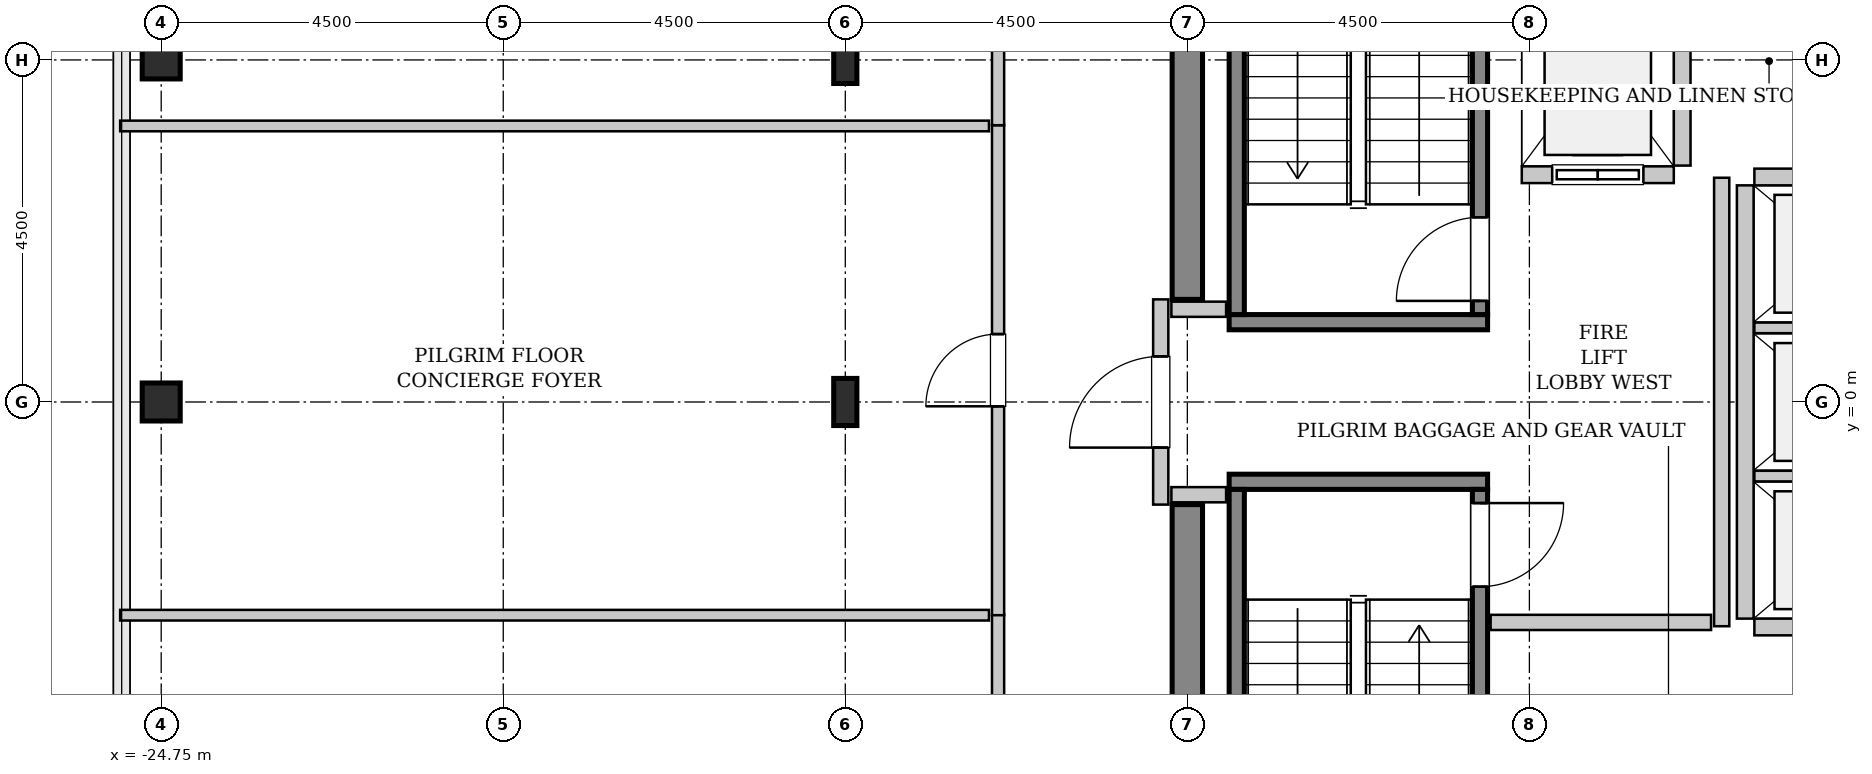
"""IFC4 building model, lengths in metres.
Left out: names, types, materials, properties, quantities, classifications, styles, units other than length and angle.
Written with IfcOpenShell. Run it as: python <this file> out.ifc"""

import sys

from ifc_helpers import new_model, si_unit, direction, frame, frame_2d, origin, origin_2d, place, context, subcontext, project, spatial, rectangle, hollow_rectangle, i_section, extrude, source, transform, mapped, element, fill, save


model = new_model("IFC4")
c1 = context("Model", 3, precision=1e-05, world=origin(), true_north=direction((0.0, 1.0)))
c2 = subcontext(c1, "Body", "Model", "MODEL_VIEW")
j1 = project(units=[si_unit("LENGTHUNIT", "METRE"), si_unit("PLANEANGLEUNIT", "RADIAN")], contexts=[c1])
p1 = place(None, origin())
s1 = spatial("IfcSite", under=j1, at=p1, CompositionType="ELEMENT")
p2 = place(p1, origin())
s2 = spatial("IfcBuilding", under=s1, at=p2, CompositionType="ELEMENT")
p3 = place(p2, frame((0.0, 0.0, 337.6)))
s3 = spatial("IfcBuildingStorey", under=s2, at=p3, CompositionType="ELEMENT", Elevation=337.6)
m1 = source(origin(), c2, "Body", "SweptSolid", [
    extrude(rectangle(XDim=7.45, YDim=0.4, at=frame_2d((3.725, 0.0))), origin(), (0.0, 0.0, 1.0), 3.8),
])
for number, where, z_axis, x_axis in (
    (1, (-11.25, -8.8, 0.0), (0.0, 0.0, 1.0), (0.0, 1.0, 0.0)),
    (2, (-11.25, 1.35, 0.0), (0.0, 0.0, 1.0), (0.0, 1.0, 0.0)),
):
    element("IfcWall", number, at=place(p3, frame(where, z_axis=z_axis, x_axis=x_axis)), inside=s3, PredefinedType="SHEAR", context=c2, shape_type="MappedRepresentation", body=[
        mapped(m1, transform((0.0, 0.0, 0.0), x_axis=(1.0, 0.0, 0.0), y_axis=(0.0, 1.0, 0.0), z_axis=(0.0, 0.0, 1.0), scale=1.0)),
    ])
m2 = source(origin(), c2, "Body", "SweptSolid", [
    extrude(hollow_rectangle(XDim=0.5, YDim=0.5, WallThickness=0.025, InnerFilletRadius=0.025, OuterFilletRadius=0.05, at=origin_2d()), origin(), (0.0, 0.0, 1.0), 3.8),
])
for number, where, z_axis, x_axis in (
    (3, (-24.75, 0.0, 0.0), (0.0, 0.0, 1.0), (1.0, 0.0, 0.0)),
    (4, (-24.75, 4.5, 0.0), (0.0, 0.0, 1.0), (1.0, 0.0, 0.0)),
):
    element("IfcColumn", number, at=place(p3, frame(where, z_axis=z_axis, x_axis=x_axis)), inside=s3, PredefinedType="COLUMN", context=c2, shape_type="MappedRepresentation", body=[
        mapped(m2, transform((0.0, 0.0, 0.0), x_axis=(1.0, 0.0, 0.0), y_axis=(0.0, 1.0, 0.0), z_axis=(0.0, 0.0, 1.0), scale=1.0)),
    ])
m3 = source(origin(), c2, "Body", "SweptSolid", [
    extrude(i_section(OverallWidth=0.305, OverallDepth=0.62, WebThickness=0.021, FlangeThickness=0.04, FilletRadius=0.027, at=origin_2d()), origin(), (0.0, 0.0, 1.0), 3.8),
])
for number, where, z_axis, x_axis in (
    (5, (-15.75, 0.0, 0.0), (0.0, 0.0, 1.0), (1.0, 0.0, 0.0)),
    (6, (-15.75, 4.5, 0.0), (0.0, 0.0, 1.0), (1.0, 0.0, 0.0)),
):
    element("IfcColumn", number, at=place(p3, frame(where, z_axis=z_axis, x_axis=x_axis)), inside=s3, PredefinedType="COLUMN", context=c2, shape_type="MappedRepresentation", body=[
        mapped(m3, transform((0.0, 0.0, 0.0), x_axis=(1.0, 0.0, 0.0), y_axis=(0.0, 1.0, 0.0), z_axis=(0.0, 0.0, 1.0), scale=1.0)),
    ])
m4 = source(origin(), c2, "Body", "SweptSolid", [
    extrude(rectangle(XDim=3.4, YDim=0.2, at=frame_2d((1.7, 0.0))), origin(), (0.0, 0.0, 1.0), 3.8),
])
p4 = place(p3, frame((-7.3, 1.05, 0.0), z_axis=(0.0, 0.0, 1.0), x_axis=(-1.0, 0.0, 0.0)))
e7 = element("IfcWall", 7, at=p4, inside=s3, PredefinedType="SOLIDWALL", context=c2, shape_type="MappedRepresentation", body=[
    mapped(m4, transform((0.0, 0.0, 0.0), x_axis=(1.0, 0.0, 0.0), y_axis=(0.0, 1.0, 0.0), z_axis=(0.0, 0.0, 1.0), scale=1.0)),
])
m5 = source(origin(), c2, "Body", "SweptSolid", [
    extrude(rectangle(XDim=7.1, YDim=0.2, at=frame_2d((3.55, 0.0))), origin(), (0.0, 0.0, 1.0), 3.8),
])
p5 = place(p3, frame((-7.4, 1.15, 0.0), z_axis=(0.0, 0.0, 1.0), x_axis=(0.0, 1.0, 0.0)))
e8 = element("IfcWall", 8, at=p5, inside=s3, PredefinedType="SOLIDWALL", context=c2, shape_type="MappedRepresentation", body=[
    mapped(m5, transform((0.0, 0.0, 0.0), x_axis=(1.0, 0.0, 0.0), y_axis=(0.0, 1.0, 0.0), z_axis=(0.0, 0.0, 1.0), scale=1.0)),
])
p6 = place(p5, frame((0.18, 0.0, 0.0)))
e9 = element("IfcOpeningElement", 9, at=p6, cuts=e8, PredefinedType="OPENING", context=c2, shape_type="SweptSolid", body=[
    extrude(rectangle(XDim=1.1, YDim=2.15, at=frame_2d((0.55, 1.075))), frame((0.0, 0.11, 0.0), z_axis=(0.0, -1.0, 0.0), x_axis=(1.0, 0.0, 0.0)), (0.0, 0.0, 1.0), 0.22),
])
p7 = place(p3, frame((-10.6, 1.15, 0.0), z_axis=(0.0, 0.0, 1.0), x_axis=(0.0, 1.0, 0.0)))
e10 = element("IfcWall", 10, at=p7, inside=s3, PredefinedType="SOLIDWALL", context=c2, shape_type="MappedRepresentation", body=[
    mapped(m5, transform((0.0, 0.0, 0.0), x_axis=(1.0, 0.0, 0.0), y_axis=(0.0, 1.0, 0.0), z_axis=(0.0, 0.0, 1.0), scale=1.0)),
])
p8 = place(p3, frame((-10.7, -1.05, 0.0), z_axis=(0.0, 0.0, 1.0), x_axis=(1.0, 0.0, 0.0)))
e11 = element("IfcWall", 11, at=p8, inside=s3, PredefinedType="SOLIDWALL", context=c2, shape_type="MappedRepresentation", body=[
    mapped(m4, transform((0.0, 0.0, 0.0), x_axis=(1.0, 0.0, 0.0), y_axis=(0.0, 1.0, 0.0), z_axis=(0.0, 0.0, 1.0), scale=1.0)),
])
p9 = place(p3, frame((-10.6, -1.15, 0.0), z_axis=(0.0, 0.0, 1.0), x_axis=(0.0, -1.0, 0.0)))
e12 = element("IfcWall", 12, at=p9, inside=s3, PredefinedType="SOLIDWALL", context=c2, shape_type="MappedRepresentation", body=[
    mapped(m5, transform((0.0, 0.0, 0.0), x_axis=(1.0, 0.0, 0.0), y_axis=(0.0, 1.0, 0.0), z_axis=(0.0, 0.0, 1.0), scale=1.0)),
])
p10 = place(p3, frame((-7.4, -1.15, 0.0), z_axis=(0.0, 0.0, 1.0), x_axis=(0.0, -1.0, 0.0)))
e13 = element("IfcWall", 13, at=p10, inside=s3, PredefinedType="SOLIDWALL", context=c2, shape_type="MappedRepresentation", body=[
    mapped(m5, transform((0.0, 0.0, 0.0), x_axis=(1.0, 0.0, 0.0), y_axis=(0.0, 1.0, 0.0), z_axis=(0.0, 0.0, 1.0), scale=1.0)),
])
p11 = place(p10, frame((0.18, 0.0, 0.0)))
e14 = element("IfcOpeningElement", 14, at=p11, cuts=e13, PredefinedType="OPENING", context=c2, shape_type="SweptSolid", body=[
    extrude(rectangle(XDim=1.1, YDim=2.15, at=frame_2d((0.55, 1.075))), frame((0.0, 0.11, 0.0), z_axis=(0.0, -1.0, 0.0), x_axis=(1.0, 0.0, 0.0)), (0.0, 0.0, 1.0), 0.22),
])
m6 = source(origin(), c2, "Body", "SweptSolid", [
    extrude(rectangle(XDim=2.0, YDim=0.22, at=frame_2d((1.0, 0.0))), origin(), (0.0, 0.0, 1.0), 3.535),
])
p12 = place(p3, frame((-6.85, 2.99, 0.0), z_axis=(0.0, 0.0, 1.0), x_axis=(1.0, 0.0, 0.0)))
e15 = element("IfcWall", 15, at=p12, inside=s3, PredefinedType="SOLIDWALL", context=c2, shape_type="MappedRepresentation", body=[
    mapped(m6, transform((0.0, 0.0, 0.0), x_axis=(1.0, 0.0, 0.0), y_axis=(0.0, 1.0, 0.0), z_axis=(0.0, 0.0, 1.0), scale=1.0)),
])
p13 = place(p12, frame((0.4, 0.0, 0.0)))
e16 = element("IfcOpeningElement", 16, at=p13, cuts=e15, PredefinedType="OPENING", context=c2, shape_type="SweptSolid", body=[
    extrude(rectangle(XDim=1.2, YDim=2.2, at=frame_2d((0.6, 1.1))), frame((0.0, 0.12, 0.0), z_axis=(0.0, -1.0, 0.0), x_axis=(1.0, 0.0, 0.0)), (0.0, 0.0, 1.0), 0.24),
])
m7 = source(origin(), c2, "Body", "SweptSolid", [
    extrude(rectangle(XDim=2.68, YDim=0.22, at=frame_2d((1.34, 0.0))), origin(), (0.0, 0.0, 1.0), 3.535),
])
p14 = place(p3, frame((-4.74, 3.11, 0.0), z_axis=(0.0, 0.0, 1.0), x_axis=(0.0, 1.0, 0.0)))
e17 = element("IfcWall", 17, at=p14, inside=s3, PredefinedType="SOLIDWALL", context=c2, shape_type="MappedRepresentation", body=[
    mapped(m7, transform((0.0, 0.0, 0.0), x_axis=(1.0, 0.0, 0.0), y_axis=(0.0, 1.0, 0.0), z_axis=(0.0, 0.0, 1.0), scale=1.0)),
])
m8 = source(origin(), c2, "Body", "SweptSolid", [
    extrude(rectangle(XDim=5.7, YDim=0.22, at=frame_2d((2.85, 0.0))), origin(), (0.0, 0.0, 1.0), 3.535),
])
p15 = place(p3, frame((-3.91, 2.85, 0.0), z_axis=(0.0, 0.0, 1.0), x_axis=(0.0, -1.0, 0.0)))
e18 = element("IfcWall", 18, at=p15, inside=s3, PredefinedType="SOLIDWALL", context=c2, shape_type="MappedRepresentation", body=[
    mapped(m8, transform((0.0, 0.0, 0.0), x_axis=(1.0, 0.0, 0.0), y_axis=(0.0, 1.0, 0.0), z_axis=(0.0, 0.0, 1.0), scale=1.0)),
])
m9 = source(origin(), c2, "Body", "SweptSolid", [
    extrude(rectangle(XDim=2.13, YDim=0.22, at=frame_2d((1.065, 0.0))), origin(), (0.0, 0.0, 1.0), 3.535),
])
p16 = place(p3, frame((-3.79, -2.96, 0.0), z_axis=(0.0, 0.0, 1.0), x_axis=(1.0, 0.0, 0.0)))
e19 = element("IfcWall", 19, at=p16, inside=s3, PredefinedType="SOLIDWALL", context=c2, shape_type="MappedRepresentation", body=[
    mapped(m9, transform((0.0, 0.0, 0.0), x_axis=(1.0, 0.0, 0.0), y_axis=(0.0, 1.0, 0.0), z_axis=(0.0, 0.0, 1.0), scale=1.0)),
])
m10 = source(origin(), c2, "Body", "SweptSolid", [
    extrude(rectangle(XDim=2.13, YDim=0.14, at=frame_2d((1.065, 0.0))), origin(), (0.0, 0.0, 1.0), 3.535),
])
for number, where, z_axis, x_axis in (
    (20, (-3.79, -0.975, 0.0), (0.0, 0.0, 1.0), (1.0, 0.0, 0.0)),
    (21, (-3.79, 0.975, 0.0), (0.0, 0.0, 1.0), (1.0, 0.0, 0.0)),
):
    element("IfcWall", number, at=place(p3, frame(where, z_axis=z_axis, x_axis=x_axis)), inside=s3, PredefinedType="PARTITIONING", context=c2, shape_type="MappedRepresentation", body=[
        mapped(m10, transform((0.0, 0.0, 0.0), x_axis=(1.0, 0.0, 0.0), y_axis=(0.0, 1.0, 0.0), z_axis=(0.0, 0.0, 1.0), scale=1.0)),
    ])
p17 = place(p3, frame((-1.66, 2.96, 0.0), z_axis=(0.0, 0.0, 1.0), x_axis=(-1.0, 0.0, 0.0)))
e22 = element("IfcWall", 22, at=p17, inside=s3, PredefinedType="SOLIDWALL", context=c2, shape_type="MappedRepresentation", body=[
    mapped(m9, transform((0.0, 0.0, 0.0), x_axis=(1.0, 0.0, 0.0), y_axis=(0.0, 1.0, 0.0), z_axis=(0.0, 0.0, 1.0), scale=1.0)),
])
m11 = source(origin(), c2, "Body", "SweptSolid", [
    extrude(rectangle(XDim=2.7, YDim=0.2, at=frame_2d((1.35, 0.0))), origin(), (0.0, 0.0, 1.0), 2.625),
])
p18 = place(p3, frame((-11.6, -1.35, 0.0), z_axis=(0.0, 0.0, 1.0), x_axis=(0.0, 1.0, 0.0)))
e23 = element("IfcWall", 23, at=p18, inside=s3, PredefinedType="PARTITIONING", context=c2, shape_type="MappedRepresentation", body=[
    mapped(m11, transform((0.0, 0.0, 0.0), x_axis=(1.0, 0.0, 0.0), y_axis=(0.0, 1.0, 0.0), z_axis=(0.0, 0.0, 1.0), scale=1.0)),
])
p19 = place(p18, frame((0.75, 0.0, 0.0)))
e24 = element("IfcOpeningElement", 24, at=p19, cuts=e23, PredefinedType="OPENING", context=c2, shape_type="SweptSolid", body=[
    extrude(rectangle(XDim=1.2, YDim=2.15, at=frame_2d((0.6, 1.075))), frame((0.0, 0.11, 0.0), z_axis=(0.0, -1.0, 0.0), x_axis=(1.0, 0.0, 0.0)), (0.0, 0.0, 1.0), 0.22),
])
m12 = source(origin(), c2, "Body", "SweptSolid", [
    extrude(rectangle(XDim=5.9, YDim=0.2, at=frame_2d((2.95, 0.0))), origin(), (0.0, 0.0, 1.0), 3.535),
])
p20 = place(p3, frame((-4.22, -2.95, 0.0), z_axis=(0.0, 0.0, 1.0), x_axis=(0.0, 1.0, 0.0)))
e25 = element("IfcWall", 25, at=p20, inside=s3, PredefinedType="PARTITIONING", context=c2, shape_type="MappedRepresentation", body=[
    mapped(m12, transform((0.0, 0.0, 0.0), x_axis=(1.0, 0.0, 0.0), y_axis=(0.0, 1.0, 0.0), z_axis=(0.0, 0.0, 1.0), scale=1.0)),
])
m13 = source(origin(), c2, "Body", "SweptSolid", [
    extrude(rectangle(XDim=2.9, YDim=0.2, at=frame_2d((1.45, 0.0))), origin(), (0.0, 0.0, 1.0), 3.535),
])
p21 = place(p3, frame((-7.26, -2.9, 0.0), z_axis=(0.0, 0.0, 1.0), x_axis=(1.0, 0.0, 0.0)))
e26 = element("IfcWall", 26, at=p21, inside=s3, PredefinedType="PARTITIONING", context=c2, shape_type="MappedRepresentation", body=[
    mapped(m13, transform((0.0, 0.0, 0.0), x_axis=(1.0, 0.0, 0.0), y_axis=(0.0, 1.0, 0.0), z_axis=(0.0, 0.0, 1.0), scale=1.0)),
])
m14 = source(origin(), c2, "Body", "SweptSolid", [
    extrude(rectangle(XDim=0.72, YDim=0.2, at=frame_2d((0.36, 0.0))), origin(), (0.0, 0.0, 1.0), 3.535),
])
for number, where, z_axis, x_axis in (
    (27, (-11.46, 1.22, 0.0), (0.0, 0.0, 1.0), (1.0, 0.0, 0.0)),
    (28, (-11.46, -1.22, 0.0), (0.0, 0.0, 1.0), (1.0, 0.0, 0.0)),
):
    element("IfcWall", number, at=place(p3, frame(where, z_axis=z_axis, x_axis=x_axis)), inside=s3, PredefinedType="PARTITIONING", context=c2, shape_type="MappedRepresentation", body=[
        mapped(m14, transform((0.0, 0.0, 0.0), x_axis=(1.0, 0.0, 0.0), y_axis=(0.0, 1.0, 0.0), z_axis=(0.0, 0.0, 1.0), scale=1.0)),
    ])
m15 = source(origin(), c2, "Body", "SweptSolid", [
    extrude(rectangle(XDim=20.245, YDim=0.16, at=frame_2d((10.123, 0.0))), origin(), (0.0, 0.0, 1.0), 3.535),
])
p22 = place(p3, frame((-13.74, -23.04, 0.0), z_axis=(0.0, 0.0, 1.0), x_axis=(0.0, 1.0, 0.0)))
e29 = element("IfcWall", 29, at=p22, inside=s3, PredefinedType="PARTITIONING", context=c2, shape_type="MappedRepresentation", body=[
    mapped(m15, transform((0.0, 0.0, 0.0), x_axis=(1.0, 0.0, 0.0), y_axis=(0.0, 1.0, 0.0), z_axis=(0.0, 0.0, 1.0), scale=1.0)),
])
p23 = place(p22, frame((15.413, 0.0, 0.0)))
e30 = element("IfcOpeningElement", 30, at=p23, cuts=e29, PredefinedType="OPENING", context=c2, shape_type="SweptSolid", body=[
    extrude(rectangle(XDim=0.95, YDim=2.1, at=frame_2d((0.475, 1.05))), frame((0.0, 0.09, 0.0), z_axis=(0.0, -1.0, 0.0), x_axis=(1.0, 0.0, 0.0)), (0.0, 0.0, 1.0), 0.18),
])
m16 = source(origin(), c2, "Body", "SweptSolid", [
    extrude(rectangle(XDim=11.43, YDim=0.14, at=frame_2d((5.715, 0.0))), origin(), (0.0, 0.0, 1.0), 3.535),
])
p24 = place(p3, frame((-25.29, -2.805, 0.0), z_axis=(0.0, 0.0, 1.0), x_axis=(1.0, 0.0, 0.0)))
e31 = element("IfcWall", 31, at=p24, inside=s3, PredefinedType="PARTITIONING", context=c2, shape_type="MappedRepresentation", body=[
    mapped(m16, transform((0.0, 0.0, 0.0), x_axis=(1.0, 0.0, 0.0), y_axis=(0.0, 1.0, 0.0), z_axis=(0.0, 0.0, 1.0), scale=1.0)),
])
m17 = source(origin(), c2, "Body", "SweptSolid", [
    extrude(rectangle(XDim=6.446, YDim=0.16, at=frame_2d((3.223, 0.0))), origin(), (0.0, 0.0, 1.0), 3.535),
])
p25 = place(p3, frame((-13.74, -2.805, 0.0), z_axis=(0.0, 0.0, 1.0), x_axis=(0.0, 1.0, 0.0)))
e32 = element("IfcWall", 32, at=p25, inside=s3, PredefinedType="PARTITIONING", context=c2, shape_type="MappedRepresentation", body=[
    mapped(m17, transform((0.0, 0.0, 0.0), x_axis=(1.0, 0.0, 0.0), y_axis=(0.0, 1.0, 0.0), z_axis=(0.0, 0.0, 1.0), scale=1.0)),
])
p26 = place(p25, frame((2.748, 0.0, 0.0)))
e33 = element("IfcOpeningElement", 33, at=p26, cuts=e32, PredefinedType="OPENING", context=c2, shape_type="SweptSolid", body=[
    extrude(rectangle(XDim=0.95, YDim=2.1, at=frame_2d((0.475, 1.05))), frame((0.0, 0.09, 0.0), z_axis=(0.0, -1.0, 0.0), x_axis=(1.0, 0.0, 0.0)), (0.0, 0.0, 1.0), 0.18),
])
p27 = place(p3, frame((-25.29, 3.631, 0.0), z_axis=(0.0, 0.0, 1.0), x_axis=(1.0, 0.0, 0.0)))
e34 = element("IfcWall", 34, at=p27, inside=s3, PredefinedType="PARTITIONING", context=c2, shape_type="MappedRepresentation", body=[
    mapped(m16, transform((0.0, 0.0, 0.0), x_axis=(1.0, 0.0, 0.0), y_axis=(0.0, 1.0, 0.0), z_axis=(0.0, 0.0, 1.0), scale=1.0)),
])
m18 = source(origin(), c2, "Body", "SweptSolid", [
    extrude(rectangle(XDim=6.446, YDim=0.16, at=frame_2d((3.223, 0.0))), origin(), (0.0, 0.0, 1.0), 3.535),
])
p28 = place(p3, frame((-13.74, 3.641, 0.0), z_axis=(0.0, 0.0, 1.0), x_axis=(0.0, 1.0, 0.0)))
e35 = element("IfcWall", 35, at=p28, inside=s3, PredefinedType="PARTITIONING", context=c2, shape_type="MappedRepresentation", body=[
    mapped(m18, transform((0.0, 0.0, 0.0), x_axis=(1.0, 0.0, 0.0), y_axis=(0.0, 1.0, 0.0), z_axis=(0.0, 0.0, 1.0), scale=1.0)),
])
p29 = place(p28, frame((2.748, 0.0, 0.0)))
e36 = element("IfcOpeningElement", 36, at=p29, cuts=e35, PredefinedType="OPENING", context=c2, shape_type="SweptSolid", body=[
    extrude(rectangle(XDim=0.95, YDim=2.1, at=frame_2d((0.475, 1.05))), frame((0.0, 0.09, 0.0), z_axis=(0.0, -1.0, 0.0), x_axis=(1.0, 0.0, 0.0)), (0.0, 0.0, 1.0), 0.18),
])
m19 = source(origin(), c2, "Body", "SweptSolid", [
    extrude(rectangle(XDim=1.1, YDim=2.15, at=frame_2d((0.55, 1.075))), frame((0.0, 0.025, 0.0), z_axis=(0.0, -1.0, 0.0), x_axis=(1.0, 0.0, 0.0)), (0.0, 0.0, 1.0), 0.05),
])
p30 = place(p6, origin())
e37 = element("IfcDoor", 37, at=p30, inside=s3, OperationType="SINGLE_SWING_LEFT", PredefinedType="DOOR", context=c2, shape_type="MappedRepresentation", body=[
    mapped(m19, transform((0.0, 0.0, 0.0), x_axis=(1.0, 0.0, 0.0), y_axis=(0.0, 1.0, 0.0), z_axis=(0.0, 0.0, 1.0), scale=1.0)),
])
fill(e9, e37)
p31 = place(p11, origin())
e38 = element("IfcDoor", 38, at=p31, inside=s3, OperationType="SINGLE_SWING_LEFT", PredefinedType="DOOR", context=c2, shape_type="MappedRepresentation", body=[
    mapped(m19, transform((0.0, 0.0, 0.0), x_axis=(1.0, 0.0, 0.0), y_axis=(0.0, 1.0, 0.0), z_axis=(0.0, 0.0, 1.0), scale=1.0)),
])
fill(e14, e38)
m20 = source(origin(), c2, "Body", "SweptSolid", [
    extrude(rectangle(XDim=1.2, YDim=2.2, at=frame_2d((0.6, 1.1))), frame((0.0, 0.025, 0.0), z_axis=(0.0, -1.0, 0.0), x_axis=(1.0, 0.0, 0.0)), (0.0, 0.0, 1.0), 0.05),
])
p32 = place(p13, origin())
e39 = element("IfcDoor", 39, at=p32, inside=s3, OperationType="SLIDING_TO_LEFT", PredefinedType="DOOR", context=c2, shape_type="MappedRepresentation", body=[
    mapped(m20, transform((0.0, 0.0, 0.0), x_axis=(1.0, 0.0, 0.0), y_axis=(0.0, 1.0, 0.0), z_axis=(0.0, 0.0, 1.0), scale=1.0)),
])
fill(e16, e39)
m21 = source(origin(), c2, "Body", "SweptSolid", [
    extrude(rectangle(XDim=1.2, YDim=2.15, at=frame_2d((0.6, 1.075))), frame((0.0, 0.025, 0.0), z_axis=(0.0, -1.0, 0.0), x_axis=(1.0, 0.0, 0.0)), (0.0, 0.0, 1.0), 0.05),
])
p33 = place(p19, origin())
e40 = element("IfcDoor", 40, at=p33, inside=s3, OperationType="SINGLE_SWING_LEFT", PredefinedType="DOOR", context=c2, shape_type="MappedRepresentation", body=[
    mapped(m21, transform((0.0, 0.0, 0.0), x_axis=(1.0, 0.0, 0.0), y_axis=(0.0, 1.0, 0.0), z_axis=(0.0, 0.0, 1.0), scale=1.0)),
])
fill(e24, e40)
m22 = source(origin(), c2, "Body", "SweptSolid", [
    extrude(rectangle(XDim=0.95, YDim=2.1, at=frame_2d((0.475, 1.05))), frame((0.0, 0.025, 0.0), z_axis=(0.0, -1.0, 0.0), x_axis=(1.0, 0.0, 0.0)), (0.0, 0.0, 1.0), 0.05),
])
p34 = place(p26, origin())
e41 = element("IfcDoor", 41, at=p34, inside=s3, OperationType="SINGLE_SWING_LEFT", PredefinedType="DOOR", context=c2, shape_type="MappedRepresentation", body=[
    mapped(m22, transform((0.0, 0.0, 0.0), x_axis=(1.0, 0.0, 0.0), y_axis=(0.0, 1.0, 0.0), z_axis=(0.0, 0.0, 1.0), scale=1.0)),
])
fill(e33, e41)
save(model, sys.argv[1])
